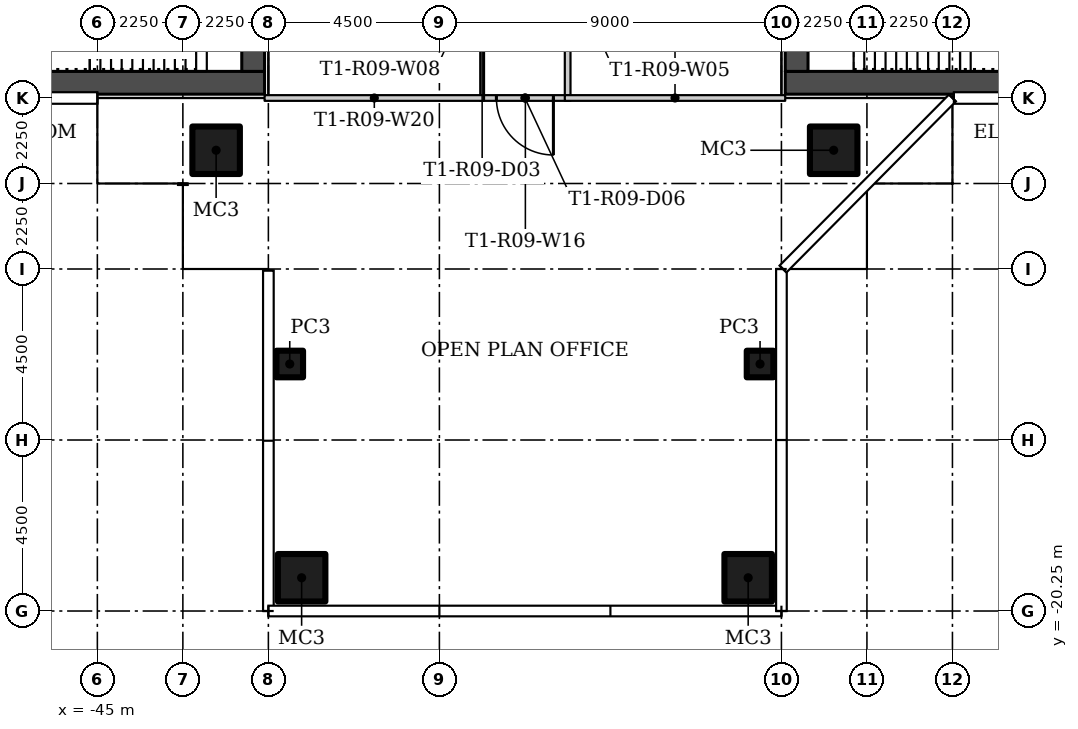
"""IFC4 building model, lengths in metres.
Left out: names, types, materials, properties, quantities, classifications, styles, units other than length and angle.
Written with IfcOpenShell. Run it as: python <this file> out.ifc"""

import sys

from ifc_helpers import new_model, si_unit, direction, frame, frame_2d, origin, origin_2d, place, context, subcontext, project, spatial, rectangle, hollow_rectangle, extrude, element, fill, save


model = new_model("IFC4")
c1 = context("Model", 3, precision=1e-05, world=origin(), true_north=direction((0.0, 1.0)))
c2 = subcontext(c1, "Body", "Model", "MODEL_VIEW")
j1 = project(units=[si_unit("LENGTHUNIT", "METRE"), si_unit("PLANEANGLEUNIT", "RADIAN")], contexts=[c1])
p1 = place(None, origin())
s1 = spatial("IfcSite", under=j1, at=p1, CompositionType="ELEMENT")
p2 = place(p1, origin())
s2 = spatial("IfcBuilding", under=s1, at=p2, CompositionType="ELEMENT")
p3 = place(p2, frame((0.0, 0.0, 89.7)))
s3 = spatial("IfcBuildingStorey", under=s2, at=p3, CompositionType="ELEMENT", Elevation=89.7)
for number, where in (
    (1, (-25.625, -8.125, 0.0)),
    (2, (-41.875, -8.125, 0.0)),
):
    element("IfcColumn", number, at=place(p3, frame(where)), inside=s3, PredefinedType="COLUMN", context=c2, shape_type="SweptSolid", body=[
        extrude(hollow_rectangle(XDim=1.25, YDim=1.25, WallThickness=0.05, at=origin_2d()), origin(), (0.0, 0.0, 1.0), 3.55),
    ])
p4 = place(p3, frame((-39.938, -13.75, 0.0)))
e3 = element("IfcColumn", 3, at=p4, inside=s3, PredefinedType="COLUMN", context=c2, shape_type="SweptSolid", body=[
    extrude(hollow_rectangle(XDim=0.7, YDim=0.7, WallThickness=0.025, at=origin_2d()), origin(), (0.0, 0.0, 1.0), 3.55),
])
p5 = place(p3, frame((-39.625, -19.375, 0.0)))
e4 = element("IfcColumn", 4, at=p5, inside=s3, PredefinedType="COLUMN", context=c2, shape_type="SweptSolid", body=[
    extrude(hollow_rectangle(XDim=1.25, YDim=1.25, WallThickness=0.05, at=origin_2d()), origin(), (0.0, 0.0, 1.0), 3.55),
])
p6 = place(p3, frame((-27.562, -13.75, 0.0)))
e5 = element("IfcColumn", 5, at=p6, inside=s3, PredefinedType="COLUMN", context=c2, shape_type="SweptSolid", body=[
    extrude(hollow_rectangle(XDim=0.7, YDim=0.7, WallThickness=0.025, at=origin_2d()), origin(), (0.0, 0.0, 1.0), 3.55),
])
p7 = place(p3, frame((-27.875, -19.375, 0.0)))
e6 = element("IfcColumn", 6, at=p7, inside=s3, PredefinedType="COLUMN", context=c2, shape_type="SweptSolid", body=[
    extrude(hollow_rectangle(XDim=1.25, YDim=1.25, WallThickness=0.05, at=origin_2d()), origin(), (0.0, 0.0, 1.0), 3.55),
])
p8 = place(p3, frame((-32.625, -0.025, 0.0), z_axis=(0.0, 0.0, 1.0), x_axis=(0.0, -1.0, 0.0)))
e7 = element("IfcWall", 7, at=p8, inside=s3, PredefinedType="PARTITIONING", context=c2, shape_type="SweptSolid", body=[
    extrude(rectangle(XDim=6.65, YDim=0.15, at=frame_2d((3.325, 0.0))), origin(), (0.0, 0.0, 1.0), 3.55),
])
p9 = place(p8, frame((2.875, 0.0, 0.0)))
e8 = element("IfcOpeningElement", 8, at=p9, cuts=e7, PredefinedType="OPENING", context=c2, shape_type="SweptSolid", body=[
    extrude(rectangle(XDim=0.9, YDim=2.1, at=frame_2d((0.45, 1.05))), frame((0.0, 0.085, 0.0), z_axis=(0.0, -1.0, 0.0), x_axis=(1.0, 0.0, 0.0)), (0.0, 0.0, 1.0), 0.17),
])
p10 = place(p3, frame((-34.875, -6.675, 0.0), z_axis=(0.0, 0.0, 1.0), x_axis=(0.0, 1.0, 0.0)))
e9 = element("IfcWall", 9, at=p10, inside=s3, PredefinedType="PARTITIONING", context=c2, shape_type="SweptSolid", body=[
    extrude(rectangle(XDim=6.675, YDim=0.1, at=frame_2d((3.337, 0.0))), origin(), (0.0, 0.0, 1.0), 3.55),
])
p11 = place(p10, frame((1.35, 0.0, 0.0)))
e10 = element("IfcOpeningElement", 10, at=p11, cuts=e9, PredefinedType="OPENING", context=c2, shape_type="SweptSolid", body=[
    extrude(rectangle(XDim=0.9, YDim=2.1, at=frame_2d((0.45, 1.05))), frame((0.0, 0.06, 0.0), z_axis=(0.0, -1.0, 0.0), x_axis=(1.0, 0.0, 0.0)), (0.0, 0.0, 1.0), 0.12),
])
p12 = place(p3, frame((-32.55, -6.75, 0.0), z_axis=(0.0, 0.0, 1.0), x_axis=(-1.0, 0.0, 0.0)))
e11 = element("IfcWall", 11, at=p12, inside=s3, PredefinedType="PARTITIONING", context=c2, shape_type="SweptSolid", body=[
    extrude(rectangle(XDim=2.375, YDim=0.15, at=frame_2d((1.188, 0.0))), origin(), (0.0, 0.0, 1.0), 3.55),
])
p13 = place(p12, frame((0.45, 0.0, 0.0)))
e12 = element("IfcOpeningElement", 12, at=p13, cuts=e11, PredefinedType="OPENING", context=c2, shape_type="SweptSolid", body=[
    extrude(rectangle(XDim=1.5, YDim=2.1, at=frame_2d((0.75, 1.05))), frame((0.0, 0.085, 0.0), z_axis=(0.0, -1.0, 0.0), x_axis=(1.0, 0.0, 0.0)), (0.0, 0.0, 1.0), 0.17),
])
p14 = place(p3, frame((-40.6, -6.75, 0.0)))
e13 = element("IfcWall", 13, at=p14, inside=s3, PredefinedType="PARTITIONING", context=c2, shape_type="SweptSolid", body=[
    extrude(rectangle(XDim=5.775, YDim=0.15, at=frame_2d((2.888, 0.0))), origin(), (0.0, 0.0, 1.0), 3.55),
])
p15 = place(p3, frame((-32.7, -6.75, 0.0)))
e14 = element("IfcWall", 14, at=p15, inside=s3, PredefinedType="PARTITIONING", context=c2, shape_type="SweptSolid", body=[
    extrude(rectangle(XDim=5.8, YDim=0.15, at=frame_2d((2.9, 0.0))), origin(), (0.0, 0.0, 1.0), 3.55),
])
p16 = place(p3, frame((-26.9, -6.35, 0.0)))
e15 = element("IfcWall", 15, at=p16, inside=s3, PredefinedType="SHEAR", context=c2, shape_type="SweptSolid", body=[
    extrude(rectangle(XDim=13.3, YDim=0.6, at=frame_2d((6.65, 0.0))), origin(), (0.0, 0.0, 1.0), 3.55),
])
p17 = place(p3, frame((-26.6, 6.05, 0.0), z_axis=(0.0, 0.0, 1.0), x_axis=(0.0, -1.0, 0.0)))
e16 = element("IfcWall", 16, at=p17, inside=s3, PredefinedType="SHEAR", context=c2, shape_type="SweptSolid", body=[
    extrude(rectangle(XDim=12.1, YDim=0.6, at=frame_2d((6.05, 0.0))), origin(), (0.0, 0.0, 1.0), 3.55),
])
p18 = place(p17, frame((3.9, 0.0, 0.0)))
e17 = element("IfcOpeningElement", 17, at=p18, cuts=e16, PredefinedType="OPENING", context=c2, shape_type="SweptSolid", body=[
    extrude(rectangle(XDim=1.8, YDim=2.4, at=frame_2d((0.9, 1.2))), frame((0.0, 0.31, 0.0), z_axis=(0.0, -1.0, 0.0), x_axis=(1.0, 0.0, 0.0)), (0.0, 0.0, 1.0), 0.62),
])
p19 = place(p3, frame((-40.6, -6.35, 0.0), z_axis=(0.0, 0.0, 1.0), x_axis=(-1.0, 0.0, 0.0)))
e18 = element("IfcWall", 18, at=p19, inside=s3, PredefinedType="SHEAR", context=c2, shape_type="SweptSolid", body=[
    extrude(rectangle(XDim=13.3, YDim=0.6, at=frame_2d((6.65, 0.0))), origin(), (0.0, 0.0, 1.0), 3.55),
])
p20 = place(p3, frame((-40.9, -6.05, 0.0), z_axis=(0.0, 0.0, 1.0), x_axis=(0.0, 1.0, 0.0)))
e19 = element("IfcWall", 19, at=p20, inside=s3, PredefinedType="SHEAR", context=c2, shape_type="SweptSolid", body=[
    extrude(rectangle(XDim=12.1, YDim=0.6, at=frame_2d((6.05, 0.0))), origin(), (0.0, 0.0, 1.0), 3.55),
])
p21 = place(p20, frame((6.4, 0.0, 0.0)))
e20 = element("IfcOpeningElement", 20, at=p21, cuts=e19, PredefinedType="OPENING", context=c2, shape_type="SweptSolid", body=[
    extrude(rectangle(XDim=1.8, YDim=2.4, at=frame_2d((0.9, 1.2))), frame((0.0, 0.31, 0.0), z_axis=(0.0, -1.0, 0.0), x_axis=(1.0, 0.0, 0.0)), (0.0, 0.0, 1.0), 0.62),
])
p22 = place(p13, origin())
e21 = element("IfcDoor", 21, at=p22, inside=s3, OperationType="DOUBLE_DOOR_SINGLE_SWING", PredefinedType="DOOR", context=c2, shape_type="SweptSolid", body=[
    extrude(rectangle(XDim=1.5, YDim=2.1, at=frame_2d((0.75, 1.05))), frame((0.0, 0.025, 0.0), z_axis=(0.0, -1.0, 0.0), x_axis=(1.0, 0.0, 0.0)), (0.0, 0.0, 1.0), 0.05),
])
fill(e12, e21)
save(model, sys.argv[1])
